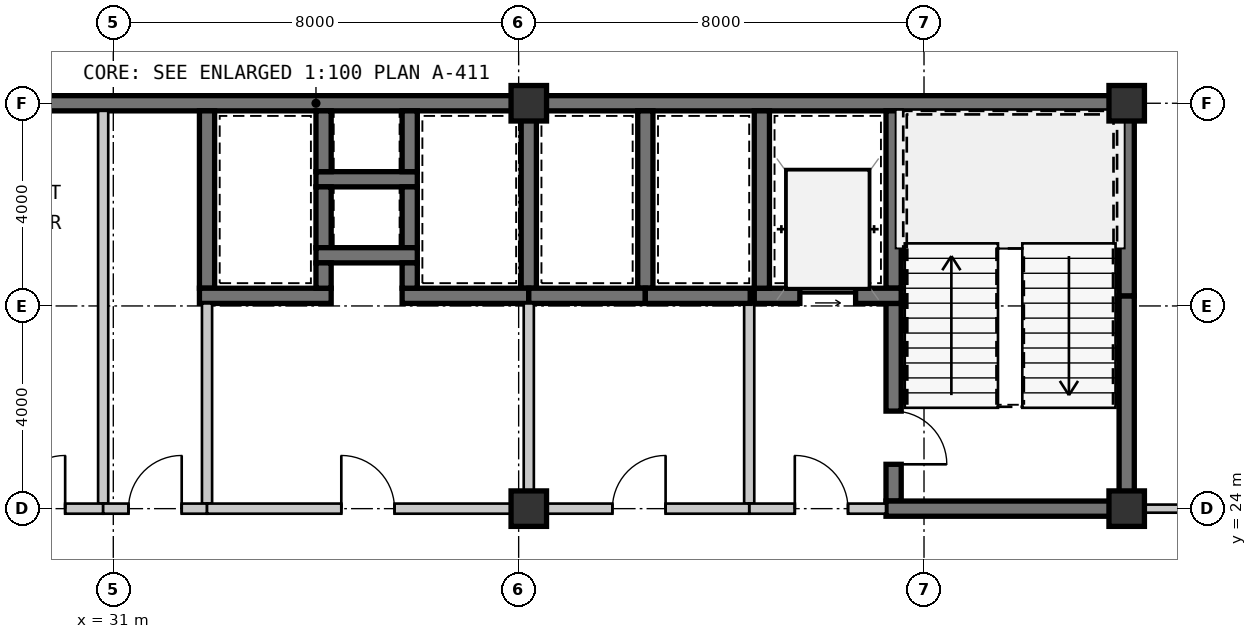
"""IFC4 building model, lengths in metres.
Left out: names, types, materials, properties, quantities, classifications, styles, units other than length and angle.
Written with IfcOpenShell. Run it as: python <this file> out.ifc"""

import sys

from ifc_helpers import new_model, si_unit, direction, frame, frame_2d, origin, origin_2d, place, context, subcontext, project, spatial, rectangle, extrude, source, transform, mapped, element, fill, save


model = new_model("IFC4")
c1 = context("Model", 3, precision=1e-05, world=origin(), true_north=direction((0.0, 1.0)))
c2 = subcontext(c1, "Body", "Model", "MODEL_VIEW")
j1 = project(units=[si_unit("LENGTHUNIT", "METRE"), si_unit("PLANEANGLEUNIT", "RADIAN")], contexts=[c1])
p1 = place(None, origin())
s1 = spatial("IfcSite", under=j1, at=p1, CompositionType="ELEMENT")
p2 = place(p1, origin())
s2 = spatial("IfcBuilding", under=s1, at=p2, CompositionType="ELEMENT")
p3 = place(p2, frame((0.0, 0.0, 112.35)))
s3 = spatial("IfcBuildingStorey", under=s2, at=p3, CompositionType="ELEMENT", Elevation=112.35)
m1 = source(origin(), c2, "Body", "SweptSolid", [
    extrude(rectangle(XDim=0.7, YDim=0.7, at=origin_2d()), origin(), (0.0, 0.0, 1.0), 4.2),
])
for number, where, z_axis, x_axis in (
    (1, (39.2, 24.0, 0.0), (0.0, 0.0, 1.0), (1.0, 0.0, 0.0)),
    (2, (51.0, 24.0, 0.0), (0.0, 0.0, 1.0), (1.0, 0.0, 0.0)),
    (3, (39.2, 32.0, 0.0), (0.0, 0.0, 1.0), (1.0, 0.0, 0.0)),
    (4, (51.0, 32.0, 0.0), (0.0, 0.0, 1.0), (1.0, 0.0, 0.0)),
):
    element("IfcColumn", number, at=place(p3, frame(where, z_axis=z_axis, x_axis=x_axis)), inside=s3, PredefinedType="COLUMN", context=c2, shape_type="MappedRepresentation", body=[
        mapped(m1, transform((0.0, 0.0, 0.0), scale=1.0)),
    ])
m2 = source(origin(), c2, "Body", "SweptSolid", [
    extrude(rectangle(XDim=11.2, YDim=0.3, at=frame_2d((5.6, 0.0))), origin(), (0.0, 0.0, 1.0), 3.78),
])
p4 = place(p3, frame((28.0, 32.0, 0.0), z_axis=(0.0, 0.0, 1.0), x_axis=(1.0, 0.0, 0.0)))
e5 = element("IfcWall", 5, at=p4, inside=s3, PredefinedType="SHEAR", context=c2, shape_type="MappedRepresentation", body=[
    mapped(m2, transform((0.0, 0.0, 0.0), scale=1.0)),
])
m3 = source(origin(), c2, "Body", "SweptSolid", [
    extrude(rectangle(XDim=11.95, YDim=0.3, at=frame_2d((5.975, 0.0))), origin(), (0.0, 0.0, 1.0), 3.78),
])
p5 = place(p3, frame((39.2, 32.0, 0.0), z_axis=(0.0, 0.0, 1.0), x_axis=(1.0, 0.0, 0.0)))
e6 = element("IfcWall", 6, at=p5, inside=s3, PredefinedType="SHEAR", context=c2, shape_type="MappedRepresentation", body=[
    mapped(m3, transform((0.0, 0.0, 0.0), scale=1.0)),
])
m4 = source(origin(), c2, "Body", "SweptSolid", [
    extrude(rectangle(XDim=4.05, YDim=0.3, at=frame_2d((2.025, 0.0))), origin(), (0.0, 0.0, 1.0), 3.78),
])
p6 = place(p3, frame((51.0, 24.15, 0.0), z_axis=(0.0, 0.0, 1.0), x_axis=(0.0, 1.0, 0.0)))
e7 = element("IfcWall", 7, at=p6, inside=s3, PredefinedType="SHEAR", context=c2, shape_type="MappedRepresentation", body=[
    mapped(m4, transform((0.0, 0.0, 0.0), scale=1.0)),
])
m5 = source(origin(), c2, "Body", "SweptSolid", [
    extrude(rectangle(XDim=3.65, YDim=0.3, at=frame_2d((1.825, 0.0))), origin(), (0.0, 0.0, 1.0), 3.78),
])
p7 = place(p3, frame((51.0, 28.2, 0.0), z_axis=(0.0, 0.0, 1.0), x_axis=(0.0, 1.0, 0.0)))
e8 = element("IfcWall", 8, at=p7, inside=s3, PredefinedType="SHEAR", context=c2, shape_type="MappedRepresentation", body=[
    mapped(m5, transform((0.0, 0.0, 0.0), scale=1.0)),
])
m6 = source(origin(), c2, "Body", "SweptSolid", [
    extrude(rectangle(XDim=3.5, YDim=0.3, at=frame_2d((1.75, 0.0))), origin(), (0.0, 0.0, 1.0), 3.78),
])
p8 = place(p3, frame((46.4, 31.85, 0.0), z_axis=(0.0, 0.0, 1.0), x_axis=(0.0, -1.0, 0.0)))
e9 = element("IfcWall", 9, at=p8, inside=s3, PredefinedType="SHEAR", context=c2, shape_type="MappedRepresentation", body=[
    mapped(m6, transform((0.0, 0.0, 0.0), scale=1.0)),
])
m7 = source(origin(), c2, "Body", "SweptSolid", [
    extrude(rectangle(XDim=3.9, YDim=0.3, at=frame_2d((1.95, 0.0))), origin(), (0.0, 0.0, 1.0), 3.78),
])
p9 = place(p3, frame((46.4, 28.05, 0.0), z_axis=(0.0, 0.0, 1.0), x_axis=(0.0, -1.0, 0.0)))
e10 = element("IfcWall", 10, at=p9, inside=s3, PredefinedType="SHEAR", context=c2, shape_type="MappedRepresentation", body=[
    mapped(m7, transform((0.0, 0.0, 0.0), scale=1.0)),
])
m8 = source(origin(), c2, "Body", "SweptSolid", [
    extrude(rectangle(XDim=1.05, YDim=2.1, at=frame_2d((0.525, 1.05))), frame((0.0, 0.16, 0.0), z_axis=(0.0, -1.0, 0.0), x_axis=(1.0, 0.0, 0.0)), (0.0, 0.0, 1.0), 0.32),
])
p10 = place(p9, frame((2.125, 0.0, 0.0)))
e11 = element("IfcOpeningElement", 11, at=p10, cuts=e10, PredefinedType="OPENING", context=c2, shape_type="MappedRepresentation", body=[
    mapped(m8, transform((0.0, 0.0, 0.0), scale=1.0)),
])
m9 = source(origin(), c2, "Body", "SweptSolid", [
    extrude(rectangle(XDim=4.9, YDim=0.3, at=frame_2d((2.45, 0.0))), origin(), (0.0, 0.0, 1.0), 3.78),
])
p11 = place(p3, frame((46.25, 24.0, 0.0), z_axis=(0.0, 0.0, 1.0), x_axis=(1.0, 0.0, 0.0)))
e12 = element("IfcWall", 12, at=p11, inside=s3, PredefinedType="SHEAR", context=c2, shape_type="MappedRepresentation", body=[
    mapped(m9, transform((0.0, 0.0, 0.0), scale=1.0)),
])
m10 = source(origin(), c2, "Body", "SweptSolid", [
    extrude(rectangle(XDim=2.9, YDim=0.3, at=frame_2d((1.45, 0.0))), origin(), (0.0, 0.0, 1.0), 3.78),
])
p12 = place(p3, frame((43.65, 28.2, 0.0), z_axis=(0.0, 0.0, 1.0), x_axis=(1.0, 0.0, 0.0)))
e13 = element("IfcWall", 13, at=p12, inside=s3, PredefinedType="SHEAR", context=c2, shape_type="MappedRepresentation", body=[
    mapped(m10, transform((0.0, 0.0, 0.0), scale=1.0)),
])
m11 = source(origin(), c2, "Body", "SweptSolid", [
    extrude(rectangle(XDim=1.1, YDim=2.15, at=frame_2d((0.55, 1.075))), frame((0.0, 0.16, 0.0), z_axis=(0.0, -1.0, 0.0), x_axis=(1.0, 0.0, 0.0)), (0.0, 0.0, 1.0), 0.32),
])
p13 = place(p12, frame((0.9, 0.0, 0.0)))
e14 = element("IfcOpeningElement", 14, at=p13, cuts=e13, PredefinedType="OPENING", context=c2, shape_type="MappedRepresentation", body=[
    mapped(m11, transform((0.0, 0.0, 0.0), scale=1.0)),
])
p14 = place(p3, frame((43.8, 31.85, 0.0), z_axis=(0.0, 0.0, 1.0), x_axis=(0.0, -1.0, 0.0)))
e15 = element("IfcWall", 15, at=p14, inside=s3, PredefinedType="SHEAR", context=c2, shape_type="MappedRepresentation", body=[
    mapped(m6, transform((0.0, 0.0, 0.0), scale=1.0)),
])
m12 = source(origin(), c2, "Body", "SweptSolid", [
    extrude(rectangle(XDim=3.95, YDim=0.2, at=frame_2d((1.975, 0.0))), origin(), (0.0, 0.0, 1.0), 3.78),
])
p15 = place(p3, frame((43.55, 28.05, 0.0), z_axis=(0.0, 0.0, 1.0), x_axis=(0.0, -1.0, 0.0)))
e16 = element("IfcWall", 16, at=p15, inside=s3, PredefinedType="SOLIDWALL", context=c2, shape_type="MappedRepresentation", body=[
    mapped(m12, transform((0.0, 0.0, 0.0), scale=1.0)),
])
m13 = source(origin(), c2, "Body", "SweptSolid", [
    extrude(rectangle(XDim=2.7, YDim=0.2, at=frame_2d((1.35, 0.0))), origin(), (0.0, 0.0, 1.0), 3.247),
])
p16 = place(p3, frame((43.55, 24.0, 0.0), z_axis=(0.0, 0.0, 1.0), x_axis=(1.0, 0.0, 0.0)))
e17 = element("IfcWall", 17, at=p16, inside=s3, PredefinedType="SOLIDWALL", context=c2, shape_type="MappedRepresentation", body=[
    mapped(m13, transform((0.0, 0.0, 0.0), scale=1.0)),
])
m14 = source(origin(), c2, "Body", "SweptSolid", [
    extrude(rectangle(XDim=1.05, YDim=2.1, at=frame_2d((0.525, 1.05))), frame((0.0, 0.11, 0.0), z_axis=(0.0, -1.0, 0.0), x_axis=(1.0, 0.0, 0.0)), (0.0, 0.0, 1.0), 0.22),
])
p17 = place(p16, frame((0.9, 0.0, 0.0)))
e18 = element("IfcOpeningElement", 18, at=p17, cuts=e17, PredefinedType="OPENING", context=c2, shape_type="MappedRepresentation", body=[
    mapped(m14, transform((0.0, 0.0, 0.0), scale=1.0)),
])
m15 = source(origin(), c2, "Body", "SweptSolid", [
    extrude(rectangle(XDim=2.0, YDim=0.3, at=frame_2d((1.0, 0.0))), origin(), (0.0, 0.0, 1.0), 3.78),
])
p18 = place(p3, frame((35.0, 30.5, 0.0), z_axis=(0.0, 0.0, 1.0), x_axis=(1.0, 0.0, 0.0)))
e19 = element("IfcWall", 19, at=p18, inside=s3, PredefinedType="SHEAR", context=c2, shape_type="MappedRepresentation", body=[
    mapped(m15, transform((0.0, 0.0, 0.0), scale=1.0)),
])
m16 = source(origin(), c2, "Body", "SweptSolid", [
    extrude(rectangle(XDim=1.2, YDim=0.3, at=frame_2d((0.6, 0.0))), origin(), (0.0, 0.0, 1.0), 3.78),
])
for number, where, z_axis, x_axis in (
    (20, (35.15, 31.85, 0.0), (0.0, 0.0, 1.0), (0.0, -1.0, 0.0)),
    (21, (36.85, 30.65, 0.0), (0.0, 0.0, 1.0), (0.0, 1.0, 0.0)),
    (22, (35.15, 30.35, 0.0), (0.0, 0.0, 1.0), (0.0, -1.0, 0.0)),
    (23, (36.85, 29.15, 0.0), (0.0, 0.0, 1.0), (0.0, 1.0, 0.0)),
):
    element("IfcWall", number, at=place(p3, frame(where, z_axis=z_axis, x_axis=x_axis)), inside=s3, PredefinedType="SHEAR", context=c2, shape_type="MappedRepresentation", body=[
        mapped(m16, transform((0.0, 0.0, 0.0), scale=1.0)),
    ])
p19 = place(p3, frame((35.0, 29.0, 0.0), z_axis=(0.0, 0.0, 1.0), x_axis=(1.0, 0.0, 0.0)))
e24 = element("IfcWall", 24, at=p19, inside=s3, PredefinedType="SHEAR", context=c2, shape_type="MappedRepresentation", body=[
    mapped(m15, transform((0.0, 0.0, 0.0), scale=1.0)),
])
m17 = source(origin(), c2, "Body", "SweptSolid", [
    extrude(rectangle(XDim=7.75, YDim=0.2, at=frame_2d((3.875, 0.0))), origin(), (0.0, 0.0, 1.0), 3.78),
])
p20 = place(p3, frame((30.8, 31.85, 0.0), z_axis=(0.0, 0.0, 1.0), x_axis=(0.0, -1.0, 0.0)))
e25 = element("IfcWall", 25, at=p20, inside=s3, PredefinedType="SOLIDWALL", context=c2, shape_type="MappedRepresentation", body=[
    mapped(m17, transform((0.0, 0.0, 0.0), scale=1.0)),
])
m18 = source(origin(), c2, "Body", "SweptSolid", [
    extrude(rectangle(XDim=4.35, YDim=0.2, at=frame_2d((2.175, 0.0))), origin(), (0.0, 0.0, 1.0), 3.32),
])
p21 = place(p3, frame((30.8, 24.0, 0.0), z_axis=(0.0, 0.0, 1.0), x_axis=(-1.0, 0.0, 0.0)))
e26 = element("IfcWall", 26, at=p21, inside=s3, PredefinedType="SOLIDWALL", context=c2, shape_type="MappedRepresentation", body=[
    mapped(m18, transform((0.0, 0.0, 0.0), scale=1.0)),
])
p22 = place(p21, frame((0.75, 0.0, 0.0)))
e27 = element("IfcOpeningElement", 27, at=p22, cuts=e26, PredefinedType="OPENING", context=c2, shape_type="MappedRepresentation", body=[
    mapped(m14, transform((0.0, 0.0, 0.0), scale=1.0)),
])
p23 = place(p3, frame((32.85, 31.85, 0.0), z_axis=(0.0, 0.0, 1.0), x_axis=(0.0, -1.0, 0.0)))
e28 = element("IfcWall", 28, at=p23, inside=s3, PredefinedType="SHEAR", context=c2, shape_type="MappedRepresentation", body=[
    mapped(m6, transform((0.0, 0.0, 0.0), scale=1.0)),
])
m19 = source(origin(), c2, "Body", "SweptSolid", [
    extrude(rectangle(XDim=2.6, YDim=0.3, at=frame_2d((1.3, 0.0))), origin(), (0.0, 0.0, 1.0), 3.78),
])
p24 = place(p3, frame((32.7, 28.2, 0.0), z_axis=(0.0, 0.0, 1.0), x_axis=(1.0, 0.0, 0.0)))
e29 = element("IfcWall", 29, at=p24, inside=s3, PredefinedType="SHEAR", context=c2, shape_type="MappedRepresentation", body=[
    mapped(m19, transform((0.0, 0.0, 0.0), scale=1.0)),
])
m20 = source(origin(), c2, "Body", "SweptSolid", [
    extrude(rectangle(XDim=0.5, YDim=0.3, at=frame_2d((0.25, 0.0))), origin(), (0.0, 0.0, 1.0), 3.78),
])
p25 = place(p3, frame((35.15, 28.35, 0.0), z_axis=(0.0, 0.0, 1.0), x_axis=(0.0, 1.0, 0.0)))
e30 = element("IfcWall", 30, at=p25, inside=s3, PredefinedType="SHEAR", context=c2, shape_type="MappedRepresentation", body=[
    mapped(m20, transform((0.0, 0.0, 0.0), scale=1.0)),
])
p26 = place(p3, frame((39.2, 28.35, 0.0), z_axis=(0.0, 0.0, 1.0), x_axis=(0.0, 1.0, 0.0)))
e31 = element("IfcWall", 31, at=p26, inside=s3, PredefinedType="SHEAR", context=c2, shape_type="MappedRepresentation", body=[
    mapped(m6, transform((0.0, 0.0, 0.0), scale=1.0)),
])
m21 = source(origin(), c2, "Body", "SweptSolid", [
    extrude(rectangle(XDim=2.5, YDim=0.3, at=frame_2d((1.25, 0.0))), origin(), (0.0, 0.0, 1.0), 3.78),
])
p27 = place(p3, frame((36.7, 28.2, 0.0), z_axis=(0.0, 0.0, 1.0), x_axis=(1.0, 0.0, 0.0)))
e32 = element("IfcWall", 32, at=p27, inside=s3, PredefinedType="SHEAR", context=c2, shape_type="MappedRepresentation", body=[
    mapped(m21, transform((0.0, 0.0, 0.0), scale=1.0)),
])
p28 = place(p3, frame((36.85, 28.85, 0.0), z_axis=(0.0, 0.0, 1.0), x_axis=(0.0, -1.0, 0.0)))
e33 = element("IfcWall", 33, at=p28, inside=s3, PredefinedType="SHEAR", context=c2, shape_type="MappedRepresentation", body=[
    mapped(m20, transform((0.0, 0.0, 0.0), scale=1.0)),
])
p29 = place(p3, frame((41.5, 28.35, 0.0), z_axis=(0.0, 0.0, 1.0), x_axis=(0.0, 1.0, 0.0)))
e34 = element("IfcWall", 34, at=p29, inside=s3, PredefinedType="SHEAR", context=c2, shape_type="MappedRepresentation", body=[
    mapped(m6, transform((0.0, 0.0, 0.0), scale=1.0)),
])
m22 = source(origin(), c2, "Body", "SweptSolid", [
    extrude(rectangle(XDim=2.3, YDim=0.3, at=frame_2d((1.15, 0.0))), origin(), (0.0, 0.0, 1.0), 3.78),
])
p30 = place(p3, frame((39.2, 28.2, 0.0), z_axis=(0.0, 0.0, 1.0), x_axis=(1.0, 0.0, 0.0)))
e35 = element("IfcWall", 35, at=p30, inside=s3, PredefinedType="SHEAR", context=c2, shape_type="MappedRepresentation", body=[
    mapped(m22, transform((0.0, 0.0, 0.0), scale=1.0)),
])
m23 = source(origin(), c2, "Body", "SweptSolid", [
    extrude(rectangle(XDim=2.07, YDim=0.3, at=frame_2d((1.035, 0.0))), origin(), (0.0, 0.0, 1.0), 3.78),
])
p31 = place(p3, frame((41.5, 28.2, 0.0), z_axis=(0.0, 0.0, 1.0), x_axis=(1.0, 0.0, 0.0)))
e36 = element("IfcWall", 36, at=p31, inside=s3, PredefinedType="SHEAR", context=c2, shape_type="MappedRepresentation", body=[
    mapped(m23, transform((0.0, 0.0, 0.0), scale=1.0)),
])
p32 = place(p3, frame((32.85, 28.05, 0.0), z_axis=(0.0, 0.0, 1.0), x_axis=(0.0, -1.0, 0.0)))
e37 = element("IfcWall", 37, at=p32, inside=s3, PredefinedType="SOLIDWALL", context=c2, shape_type="MappedRepresentation", body=[
    mapped(m12, transform((0.0, 0.0, 0.0), scale=1.0)),
])
m24 = source(origin(), c2, "Body", "SweptSolid", [
    extrude(rectangle(XDim=2.05, YDim=0.2, at=frame_2d((1.025, 0.0))), origin(), (0.0, 0.0, 1.0), 3.32),
])
p33 = place(p3, frame((32.85, 24.0, 0.0), z_axis=(0.0, 0.0, 1.0), x_axis=(-1.0, 0.0, 0.0)))
e38 = element("IfcWall", 38, at=p33, inside=s3, PredefinedType="SOLIDWALL", context=c2, shape_type="MappedRepresentation", body=[
    mapped(m24, transform((0.0, 0.0, 0.0), scale=1.0)),
])
p34 = place(p33, frame((0.5, 0.0, 0.0)))
e39 = element("IfcOpeningElement", 39, at=p34, cuts=e38, PredefinedType="OPENING", context=c2, shape_type="MappedRepresentation", body=[
    mapped(m14, transform((0.0, 0.0, 0.0), scale=1.0)),
])
m25 = source(origin(), c2, "Body", "SweptSolid", [
    extrude(rectangle(XDim=3.95, YDim=0.2, at=frame_2d((1.975, 0.0))), origin(), (0.0, 0.0, 1.0), 3.32),
])
p35 = place(p3, frame((39.2, 28.05, 0.0), z_axis=(0.0, 0.0, 1.0), x_axis=(0.0, -1.0, 0.0)))
e40 = element("IfcWall", 40, at=p35, inside=s3, PredefinedType="SOLIDWALL", context=c2, shape_type="MappedRepresentation", body=[
    mapped(m25, transform((0.0, 0.0, 0.0), scale=1.0)),
])
m26 = source(origin(), c2, "Body", "SweptSolid", [
    extrude(rectangle(XDim=6.35, YDim=0.2, at=frame_2d((3.175, 0.0))), origin(), (0.0, 0.0, 1.0), 3.32),
])
p36 = place(p3, frame((39.2, 24.0, 0.0), z_axis=(0.0, 0.0, 1.0), x_axis=(-1.0, 0.0, 0.0)))
e41 = element("IfcWall", 41, at=p36, inside=s3, PredefinedType="SOLIDWALL", context=c2, shape_type="MappedRepresentation", body=[
    mapped(m26, transform((0.0, 0.0, 0.0), scale=1.0)),
])
p37 = place(p36, frame((2.65, 0.0, 0.0)))
e42 = element("IfcOpeningElement", 42, at=p37, cuts=e41, PredefinedType="OPENING", context=c2, shape_type="MappedRepresentation", body=[
    mapped(m14, transform((0.0, 0.0, 0.0), scale=1.0)),
])
m27 = source(origin(), c2, "Body", "SweptSolid", [
    extrude(rectangle(XDim=4.35, YDim=0.2, at=frame_2d((2.175, 0.0))), origin(), (0.0, 0.0, 1.0), 3.247),
])
p38 = place(p3, frame((43.55, 24.0, 0.0), z_axis=(0.0, 0.0, 1.0), x_axis=(-1.0, 0.0, 0.0)))
e43 = element("IfcWall", 43, at=p38, inside=s3, PredefinedType="SOLIDWALL", context=c2, shape_type="MappedRepresentation", body=[
    mapped(m27, transform((0.0, 0.0, 0.0), scale=1.0)),
])
p39 = place(p38, frame((1.65, 0.0, 0.0)))
e44 = element("IfcOpeningElement", 44, at=p39, cuts=e43, PredefinedType="OPENING", context=c2, shape_type="MappedRepresentation", body=[
    mapped(m14, transform((0.0, 0.0, 0.0), scale=1.0)),
])
m28 = source(origin(), c2, "Body", "SweptSolid", [
    extrude(rectangle(XDim=1.155, YDim=0.16, at=frame_2d((0.577, 0.0))), origin(), (0.0, 0.0, 1.0), 3.178),
])
p40 = place(p3, frame((51.15, 24.0, 0.0), z_axis=(0.0, 0.0, 1.0), x_axis=(1.0, 0.0, 0.0)))
e45 = element("IfcWall", 45, at=p40, inside=s3, PredefinedType="PARTITIONING", context=c2, shape_type="MappedRepresentation", body=[
    mapped(m28, transform((0.0, 0.0, 0.0), scale=1.0)),
])
m29 = source(origin(), c2, "Body", "SweptSolid", [
    extrude(rectangle(XDim=1.05, YDim=2.1, at=frame_2d((0.525, 1.05))), frame((0.0, 0.025, 0.0), z_axis=(0.0, -1.0, 0.0), x_axis=(1.0, 0.0, 0.0)), (0.0, 0.0, 1.0), 0.05),
])
p41 = place(p10, origin())
e46 = element("IfcDoor", 46, at=p41, inside=s3, OperationType="SINGLE_SWING_RIGHT", PredefinedType="DOOR", context=c2, shape_type="MappedRepresentation", body=[
    mapped(m29, transform((0.0, 0.0, 0.0), scale=1.0)),
])
fill(e11, e46)
m30 = source(origin(), c2, "Body", "SweptSolid", [
    extrude(rectangle(XDim=1.1, YDim=2.15, at=frame_2d((0.55, 1.075))), frame((0.0, 0.025, 0.0), z_axis=(0.0, -1.0, 0.0), x_axis=(1.0, 0.0, 0.0)), (0.0, 0.0, 1.0), 0.05),
])
p42 = place(p13, origin())
e47 = element("IfcDoor", 47, at=p42, inside=s3, OperationType="SLIDING_TO_LEFT", PredefinedType="DOOR", context=c2, shape_type="MappedRepresentation", body=[
    mapped(m30, transform((0.0, 0.0, 0.0), scale=1.0)),
])
fill(e14, e47)
p43 = place(p17, origin())
e48 = element("IfcDoor", 48, at=p43, inside=s3, OperationType="SINGLE_SWING_LEFT", PredefinedType="DOOR", context=c2, shape_type="MappedRepresentation", body=[
    mapped(m29, transform((0.0, 0.0, 0.0), scale=1.0)),
])
fill(e18, e48)
p44 = place(p22, frame((1.05, 0.0, 0.0), z_axis=(0.0, 0.0, 1.0), x_axis=(-1.0, 0.0, 0.0)))
e49 = element("IfcDoor", 49, at=p44, inside=s3, OperationType="SINGLE_SWING_RIGHT", PredefinedType="DOOR", context=c2, shape_type="MappedRepresentation", body=[
    mapped(m29, transform((0.0, 0.0, 0.0), scale=1.0)),
])
fill(e27, e49)
p45 = place(p34, frame((1.05, 0.0, 0.0), z_axis=(0.0, 0.0, 1.0), x_axis=(-1.0, 0.0, 0.0)))
e50 = element("IfcDoor", 50, at=p45, inside=s3, OperationType="SINGLE_SWING_RIGHT", PredefinedType="DOOR", context=c2, shape_type="MappedRepresentation", body=[
    mapped(m29, transform((0.0, 0.0, 0.0), scale=1.0)),
])
fill(e39, e50)
p46 = place(p37, frame((1.05, 0.0, 0.0), z_axis=(0.0, 0.0, 1.0), x_axis=(-1.0, 0.0, 0.0)))
e51 = element("IfcDoor", 51, at=p46, inside=s3, OperationType="SINGLE_SWING_LEFT", PredefinedType="DOOR", context=c2, shape_type="MappedRepresentation", body=[
    mapped(m29, transform((0.0, 0.0, 0.0), scale=1.0)),
])
fill(e42, e51)
p47 = place(p39, frame((1.05, 0.0, 0.0), z_axis=(0.0, 0.0, 1.0), x_axis=(-1.0, 0.0, 0.0)))
e52 = element("IfcDoor", 52, at=p47, inside=s3, OperationType="SINGLE_SWING_RIGHT", PredefinedType="DOOR", context=c2, shape_type="MappedRepresentation", body=[
    mapped(m29, transform((0.0, 0.0, 0.0), scale=1.0)),
])
fill(e44, e52)
save(model, sys.argv[1])
